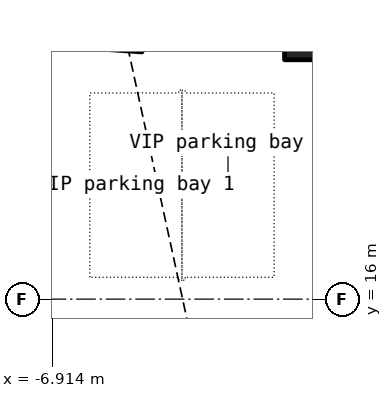
"""IFC4 building model, lengths in metres.
Left out: names, types, materials, properties, quantities, classifications, styles, units other than length and angle.
Written with IfcOpenShell. Run it as: python <this file> out.ifc"""

import sys

from ifc_helpers import new_model, si_unit, direction, frame, origin, origin_2d, place, context, subcontext, project, spatial, hollow_rectangle, extrude, element, save


model = new_model("IFC4")
c1 = context("Model", 3, precision=1e-05, world=origin(), true_north=direction((0.0, 1.0)))
c2 = subcontext(c1, "Body", "Model", "MODEL_VIEW")
j1 = project(units=[si_unit("LENGTHUNIT", "METRE"), si_unit("PLANEANGLEUNIT", "RADIAN")], contexts=[c1])
p1 = place(None, origin())
s1 = spatial("IfcSite", under=j1, at=p1, CompositionType="ELEMENT")
p2 = place(p1, origin())
s2 = spatial("IfcBuilding", under=s1, at=p2, CompositionType="ELEMENT")
p3 = place(p2, origin())
s3 = spatial("IfcBuildingStorey", under=s2, at=p3, CompositionType="ELEMENT", Elevation=0.0)
p4 = place(p3, frame((0.0, 23.098, 0.0), z_axis=(0.0, -0.028343798, 0.999598234), x_axis=(1.0, 0.0, 0.0)))
e1 = element("IfcColumn", 1, at=p4, inside=s3, PredefinedType="COLUMN", context=c2, shape_type="SweptSolid", body=[
    extrude(hollow_rectangle(XDim=1.6, YDim=1.6, WallThickness=0.04, at=origin_2d()), origin(), (0.0, 0.0, 1.0), 7.003),
])
p5 = place(p3, frame((-5.016, 23.039, 0.0), z_axis=(0.006031298, -0.02792526, 0.999591818), x_axis=(0.989957113, 0.141353514, -0.002024219)))
e2 = element("IfcColumn", 2, at=p5, inside=s3, PredefinedType="COLUMN", context=c2, shape_type="SweptSolid", body=[
    extrude(hollow_rectangle(XDim=1.0, YDim=1.0, WallThickness=0.032, at=origin_2d()), origin(), (0.0, 0.0, 1.0), 7.003),
])
save(model, sys.argv[1])
